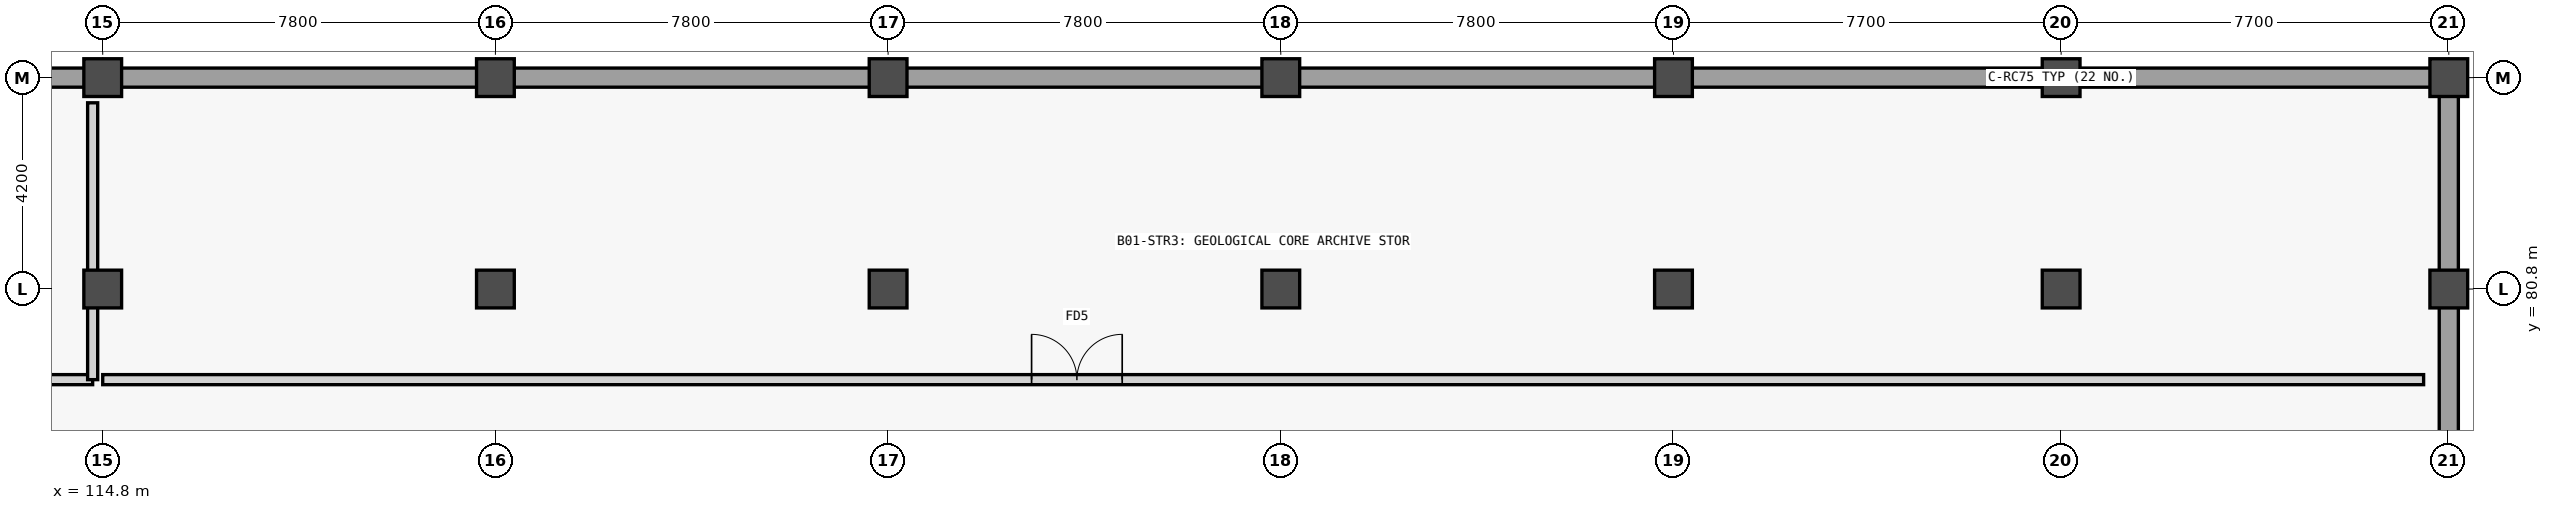
"""IFC4 building model, lengths in metres.
Left out: names, types, materials, properties, quantities, classifications, styles, units other than length and angle.
Written with IfcOpenShell. Run it as: python <this file> out.ifc"""

import sys

from ifc_helpers import new_model, si_unit, direction, frame, frame_2d, origin, origin_2d, place, context, subcontext, project, spatial, rectangle, extrude, element, fill, save


model = new_model("IFC4")
c1 = context("Model", 3, precision=1e-05, world=origin(), true_north=direction((0.0, 1.0)))
c2 = subcontext(c1, "Body", "Model", "MODEL_VIEW")
j1 = project(units=[si_unit("LENGTHUNIT", "METRE"), si_unit("PLANEANGLEUNIT", "RADIAN")], contexts=[c1])
p1 = place(None, origin())
s1 = spatial("IfcSite", under=j1, at=p1, CompositionType="ELEMENT")
p2 = place(p1, origin())
s2 = spatial("IfcBuilding", under=s1, at=p2, CompositionType="ELEMENT")
p3 = place(p2, frame((0.0, 0.0, -4.5)))
s3 = spatial("IfcBuildingStorey", under=s2, at=p3, CompositionType="ELEMENT", Elevation=-4.5)
for number, where, z_axis, x_axis in (
    (1, (114.8, 80.8, -0.45), (0.0, 0.0, 1.0), (1.0, 0.0, 0.0)),
    (2, (114.8, 85.0, -0.45), (0.0, 0.0, 1.0), (1.0, 0.0, 0.0)),
    (3, (122.6, 80.8, -0.45), (0.0, 0.0, 1.0), (1.0, 0.0, 0.0)),
    (4, (122.6, 85.0, -0.45), (0.0, 0.0, 1.0), (1.0, 0.0, 0.0)),
    (5, (130.4, 80.8, -0.45), (0.0, 0.0, 1.0), (1.0, 0.0, 0.0)),
    (6, (130.4, 85.0, -0.45), (0.0, 0.0, 1.0), (1.0, 0.0, 0.0)),
    (7, (138.2, 80.8, -0.45), (0.0, 0.0, 1.0), (1.0, 0.0, 0.0)),
    (8, (138.2, 85.0, -0.45), (0.0, 0.0, 1.0), (1.0, 0.0, 0.0)),
    (9, (146.0, 80.8, -0.45), (0.0, 0.0, 1.0), (1.0, 0.0, 0.0)),
    (10, (146.0, 85.0, -0.45), (0.0, 0.0, 1.0), (1.0, 0.0, 0.0)),
    (11, (153.7, 80.8, -0.45), (0.0, 0.0, 1.0), (1.0, 0.0, 0.0)),
    (12, (153.7, 85.0, -0.45), (0.0, 0.0, 1.0), (1.0, 0.0, 0.0)),
    (13, (161.4, 80.8, -0.45), (0.0, 0.0, 1.0), (1.0, 0.0, 0.0)),
    (14, (161.4, 85.0, -0.45), (0.0, 0.0, 1.0), (1.0, 0.0, 0.0)),
):
    element("IfcColumn", number, at=place(p3, frame(where, z_axis=z_axis, x_axis=x_axis)), inside=s3, PredefinedType="COLUMN", context=c2, shape_type="SweptSolid", body=[
        extrude(rectangle(XDim=0.75, YDim=0.75, at=origin_2d()), origin(), (0.0, 0.0, 1.0), 4.95),
    ])
p4 = place(p3, frame((161.4, 85.0, 0.0), z_axis=(0.0, 0.0, 1.0), x_axis=(0.0, -1.0, 0.0)))
e15 = element("IfcWall", 15, at=p4, inside=s3, PredefinedType="USERDEFINED", context=c2, shape_type="SweptSolid", body=[
    extrude(rectangle(XDim=21.0, YDim=0.38, at=frame_2d((10.5, 0.0))), origin(), (0.0, 0.0, 1.0), 4.05),
])
p5 = place(p3, frame((8.0, 85.0, 0.0), z_axis=(0.0, 0.0, 1.0), x_axis=(1.0, 0.0, 0.0)))
e16 = element("IfcWall", 16, at=p5, inside=s3, PredefinedType="USERDEFINED", context=c2, shape_type="SweptSolid", body=[
    extrude(rectangle(XDim=153.4, YDim=0.38, at=frame_2d((76.7, 0.0))), origin(), (0.0, 0.0, 1.0), 4.05),
])
p6 = place(p3, frame((64.6, 79.0, 0.0), z_axis=(0.0, 0.0, 1.0), x_axis=(1.0, 0.0, 0.0)))
e17 = element("IfcWall", 17, at=p6, inside=s3, PredefinedType="PARTITIONING", context=c2, shape_type="SweptSolid", body=[
    extrude(rectangle(XDim=50.0, YDim=0.2, at=frame_2d((25.0, 0.0))), origin(), (0.0, 0.0, 1.0), 4.24),
])
p7 = place(p6, frame((24.1, 0.0, 0.0)))
e18 = element("IfcOpeningElement", 18, at=p7, cuts=e17, PredefinedType="OPENING", context=c2, shape_type="SweptSolid", body=[
    extrude(rectangle(XDim=1.8, YDim=2.25, at=frame_2d((0.9, 1.125))), frame((0.0, 0.11, 0.0), z_axis=(0.0, -1.0, 0.0), x_axis=(1.0, 0.0, 0.0)), (0.0, 0.0, 1.0), 0.22),
])
p8 = place(p3, frame((114.6, 79.0, 0.0), z_axis=(0.0, 0.0, 1.0), x_axis=(0.0, 1.0, 0.0)))
e19 = element("IfcWall", 19, at=p8, inside=s3, PredefinedType="PARTITIONING", context=c2, shape_type="SweptSolid", body=[
    extrude(rectangle(XDim=5.5, YDim=0.2, at=frame_2d((2.75, 0.0))), origin(), (0.0, 0.0, 1.0), 3.45),
])
p9 = place(p3, frame((114.8, 79.0, 0.0), z_axis=(0.0, 0.0, 1.0), x_axis=(1.0, 0.0, 0.0)))
e20 = element("IfcWall", 20, at=p9, inside=s3, PredefinedType="PARTITIONING", context=c2, shape_type="SweptSolid", body=[
    extrude(rectangle(XDim=46.1, YDim=0.2, at=frame_2d((23.05, 0.0))), origin(), (0.0, 0.0, 1.0), 4.24),
])
p10 = place(p9, frame((18.45, 0.0, 0.0)))
e21 = element("IfcOpeningElement", 21, at=p10, cuts=e20, PredefinedType="OPENING", context=c2, shape_type="SweptSolid", body=[
    extrude(rectangle(XDim=1.8, YDim=2.25, at=frame_2d((0.9, 1.125))), frame((0.0, 0.11, 0.0), z_axis=(0.0, -1.0, 0.0), x_axis=(1.0, 0.0, 0.0)), (0.0, 0.0, 1.0), 0.22),
])
p11 = place(p10, origin())
e22 = element("IfcDoor", 22, at=p11, inside=s3, OperationType="DOUBLE_DOOR_SINGLE_SWING", PredefinedType="DOOR", context=c2, shape_type="SweptSolid", body=[
    extrude(rectangle(XDim=1.8, YDim=2.25, at=frame_2d((0.9, 1.125))), frame((0.0, 0.025, 0.0), z_axis=(0.0, -1.0, 0.0), x_axis=(1.0, 0.0, 0.0)), (0.0, 0.0, 1.0), 0.05),
])
fill(e21, e22)
save(model, sys.argv[1])
